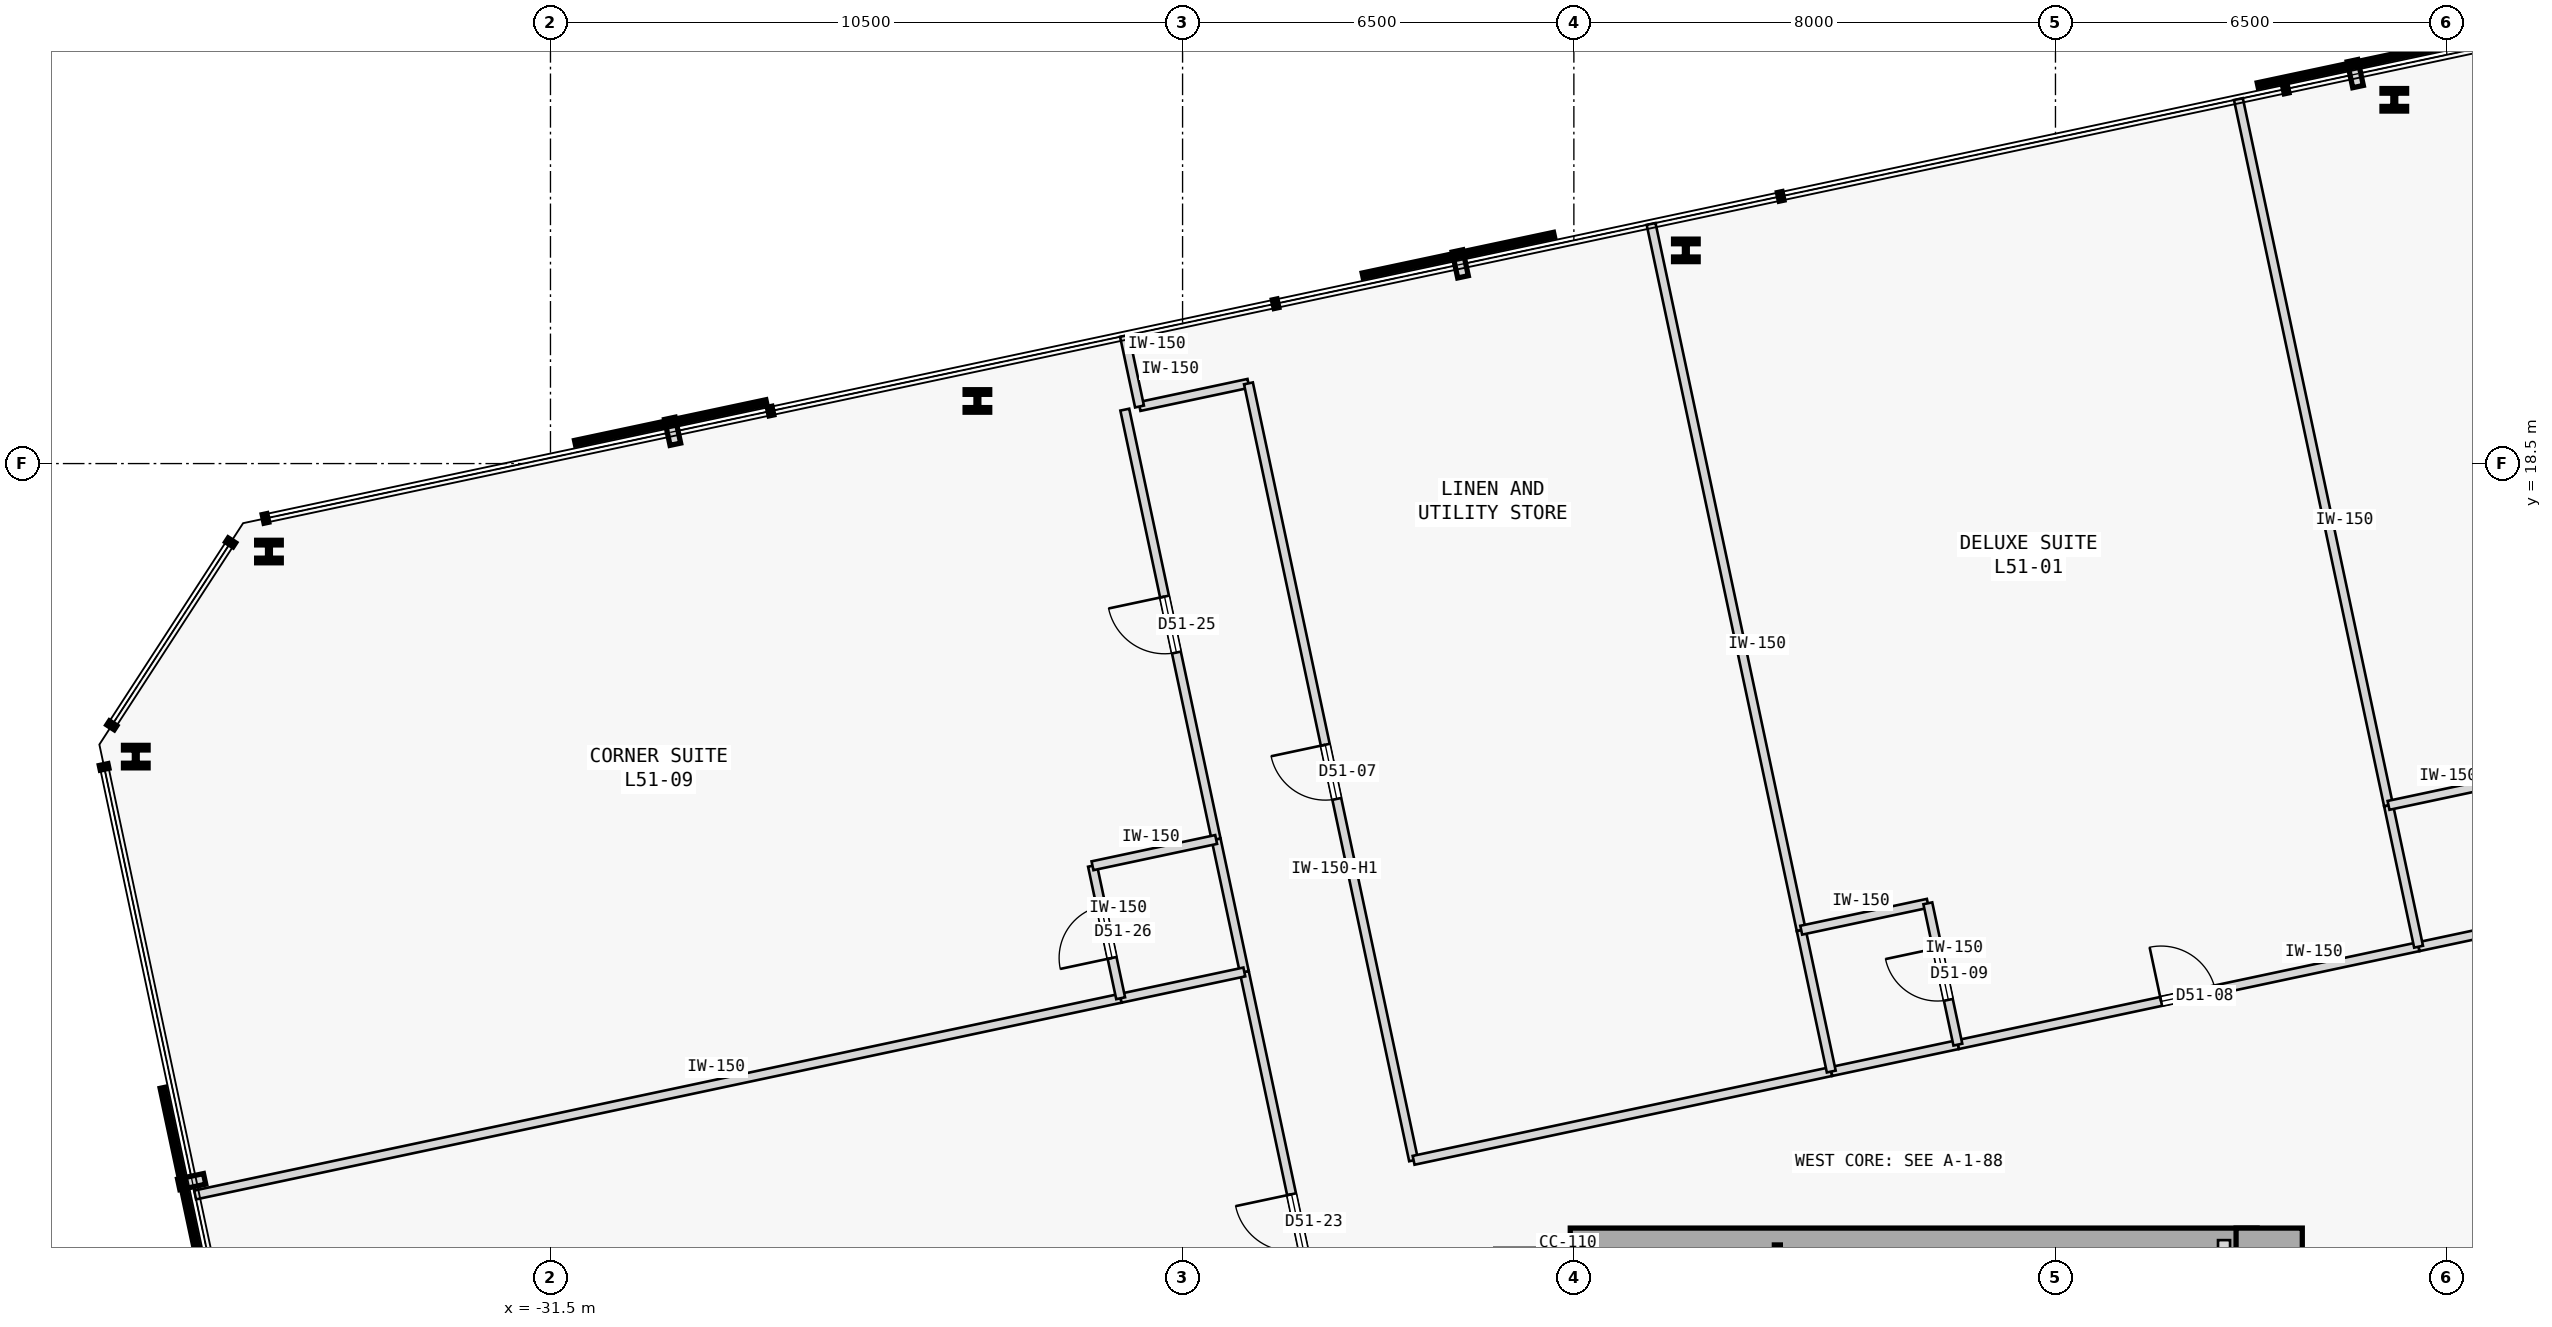
"""IFC4 building model, lengths in metres.
Left out: names, types, materials, properties, quantities, classifications, styles, units other than length and angle.
Written with IfcOpenShell. Run it as: python <this file> out.ifc"""

import sys

from ifc_helpers import new_model, si_unit, direction, frame, frame_2d, origin, origin_2d, place, context, subcontext, project, spatial, rectangle, hollow_rectangle, i_section, extrude, element, fill, save


model = new_model("IFC4")
c1 = context("Model", 3, precision=1e-05, world=origin(), true_north=direction((0.0, 1.0)))
c2 = subcontext(c1, "Body", "Model", "MODEL_VIEW")
j1 = project(units=[si_unit("LENGTHUNIT", "METRE"), si_unit("PLANEANGLEUNIT", "RADIAN")], contexts=[c1])
p1 = place(None, origin())
s1 = spatial("IfcSite", under=j1, at=p1, CompositionType="ELEMENT")
p2 = place(p1, origin())
s2 = spatial("IfcBuilding", under=s1, at=p2, CompositionType="ELEMENT")
p3 = place(p2, frame((0.0, 0.0, 195.6)))
s3 = spatial("IfcBuildingStorey", under=s2, at=p3, CompositionType="ELEMENT", Elevation=195.6)
p4 = place(p3, frame((-2.95, 5.25, 0.0), z_axis=(0.0, 0.0, 1.0), x_axis=(1.0, 0.0, 0.0)))
e1 = element("IfcColumn", 1, at=p4, inside=s3, PredefinedType="COLUMN", context=c2, shape_type="SweptSolid", body=[
    extrude(rectangle(XDim=1.1, YDim=1.1, at=origin_2d()), origin(), (0.0, 0.0, 1.0), 3.4),
])
p5 = place(p3, frame((-14.56, 5.6, 0.0), z_axis=(0.0, 0.0, 1.0), x_axis=(1.0, 0.0, 0.0)))
e2 = element("IfcWall", 2, at=p5, inside=s3, PredefinedType="SHEAR", context=c2, shape_type="SweptSolid", body=[
    extrude(rectangle(XDim=11.41, YDim=0.4, at=frame_2d((5.705, 0.0))), origin(), (0.0, 0.0, 1.0), 3.175),
])
p6 = place(p3, frame((-11.12, 5.42, 0.0), z_axis=(0.0, 0.0, 1.0), x_axis=(1.0, 0.0, 0.0)))
e3 = element("IfcColumn", 3, at=p6, inside=s3, PredefinedType="COLUMN", context=c2, shape_type="SweptSolid", body=[
    extrude(hollow_rectangle(XDim=0.1, YDim=0.2, WallThickness=0.008, at=origin_2d()), origin(), (0.0, 0.0, 1.0), 3.4),
])
for number, where, z_axis, x_axis in (
    (4, (-0.872, 24.543, 0.0), (0.0, 0.0, 1.0), (1.0, 0.0, 0.0)),
    (5, (-12.64, 22.042, 0.0), (0.0, 0.0, 1.0), (1.0, 0.0, 0.0)),
    (6, (-24.408, 19.54, 0.0), (0.0, 0.0, 1.0), (1.0, 0.0, 0.0)),
    (7, (-36.176, 17.039, 0.0), (0.0, 0.0, 1.0), (1.0, 0.0, 0.0)),
    (8, (-38.389, 13.632, 0.0), (0.0, 0.0, 1.0), (1.0, 0.0, 0.0)),
):
    element("IfcColumn", number, at=place(p3, frame(where, z_axis=z_axis, x_axis=x_axis)), inside=s3, PredefinedType="COLUMN", context=c2, shape_type="SweptSolid", body=[
        extrude(i_section(OverallWidth=0.409, OverallDepth=0.374, WebThickness=0.048, FlangeThickness=0.077, FilletRadius=0.015, at=origin_2d()), origin(), (0.0, 0.0, 1.0), 3.4),
    ])
p7 = place(p3, frame((-3.7, -1.15, 0.0), z_axis=(0.0, 0.0, 1.0), x_axis=(0.0, 1.0, 0.0)))
e9 = element("IfcWall", 9, at=p7, inside=s3, PredefinedType="STANDARD", context=c2, shape_type="SweptSolid", body=[
    extrude(rectangle(XDim=6.75, YDim=0.2, at=frame_2d((3.375, 0.0))), origin(), (0.0, 0.0, 1.0), 3.175),
])
p8 = place(p7, frame((3.6, 0.0, 0.0)))
e10 = element("IfcOpeningElement", 10, at=p8, cuts=e9, PredefinedType="OPENING", context=c2, shape_type="SweptSolid", body=[
    extrude(rectangle(XDim=0.92, YDim=2.15, at=frame_2d((0.46, 1.075))), frame((0.0, 0.11, 0.0), z_axis=(0.0, -1.0, 0.0), x_axis=(1.0, 0.0, 0.0)), (0.0, 0.0, 1.0), 0.22),
])
p9 = place(p3, frame((-21.715, 19.448, 0.0), z_axis=(0.0, 0.0, 1.0), x_axis=(0.978160192495, 0.207852442415, 0.0)))
e11 = element("IfcWall", 11, at=p9, inside=s3, PredefinedType="PARTITIONING", context=c2, shape_type="SweptSolid", body=[
    extrude(rectangle(XDim=1.85, YDim=0.15, at=frame_2d((0.925, 0.0))), origin(), (0.0, 0.0, 1.0), 3.175),
])
p10 = place(p3, frame((-17.162, 6.926, 0.0), z_axis=(0.0, 0.0, 1.0), x_axis=(-0.207911421929, 0.978147657888, 0.0)))
e12 = element("IfcWall", 12, at=p10, inside=s3, PredefinedType="PARTITIONING", context=c2, shape_type="SweptSolid", body=[
    extrude(rectangle(XDim=13.195, YDim=0.15, at=frame_2d((6.598, 0.0))), origin(), (0.0, 0.0, 1.0), 2.725),
])
p11 = place(p10, frame((6.137, 0.0, 0.0)))
e13 = element("IfcOpeningElement", 13, at=p11, cuts=e12, PredefinedType="OPENING", context=c2, shape_type="SweptSolid", body=[
    extrude(rectangle(XDim=0.92, YDim=2.15, at=frame_2d((0.46, 1.075))), frame((0.0, 0.085, 0.0), z_axis=(0.0, -1.0, 0.0), x_axis=(1.0, 0.0, 0.0)), (0.0, 0.0, 1.0), 0.17),
])
p12 = place(p3, frame((-17.162, 6.926, 0.0), z_axis=(0.0, 0.0, 1.0), x_axis=(0.978143627193, 0.207930383978, 0.0)))
e14 = element("IfcWall", 14, at=p12, inside=s3, PredefinedType="PARTITIONING", context=c2, shape_type="SweptSolid", body=[
    extrude(rectangle(XDim=7.093, YDim=0.15, at=frame_2d((3.546, 0.0))), origin(), (0.0, 0.0, 1.0), 3.175),
])
p13 = place(p3, frame((-8.121, 8.848, 0.0), z_axis=(0.0, 0.0, 1.0), x_axis=(0.978146318695, 0.207917722244, 0.0)))
e15 = element("IfcWall", 15, at=p13, inside=s3, PredefinedType="PARTITIONING", context=c2, shape_type="SweptSolid", body=[
    extrude(rectangle(XDim=7.824, YDim=0.15, at=frame_2d((3.912, 0.0))), origin(), (0.0, 0.0, 1.0), 3.175),
])
p14 = place(p13, frame((3.452, 0.0, 0.0)))
e16 = element("IfcOpeningElement", 16, at=p14, cuts=e15, PredefinedType="OPENING", context=c2, shape_type="SweptSolid", body=[
    extrude(rectangle(XDim=0.92, YDim=2.15, at=frame_2d((0.46, 1.075))), frame((0.0, 0.085, 0.0), z_axis=(0.0, -1.0, 0.0), x_axis=(1.0, 0.0, 0.0)), (0.0, 0.0, 1.0), 0.17),
])
for number, where, z_axis, x_axis in (
    (17, (-10.224, 8.401, 0.0), (0.0, 0.0, 1.0), (0.978, 0.208, 0.0)),
    (18, (-0.469, 10.474, 0.0), (0.0, 0.0, 1.0), (0.978, 0.208, 0.0)),
):
    element("IfcWall", number, at=place(p3, frame(where, z_axis=z_axis, x_axis=x_axis)), inside=s3, PredefinedType="PARTITIONING", context=c2, shape_type="SweptSolid", body=[
        extrude(rectangle(XDim=2.15, YDim=0.15, at=frame_2d((1.075, 0.0))), origin(), (0.0, 0.0, 1.0), 3.175),
    ])
p15 = place(p3, frame((-18.207, 1.74, 0.0), z_axis=(0.0, 0.0, 1.0), x_axis=(-0.207922306475, 0.978145344246, 0.0)))
e19 = element("IfcWall", 19, at=p15, inside=s3, PredefinedType="PARTITIONING", context=c2, shape_type="SweptSolid", body=[
    extrude(rectangle(XDim=8.5, YDim=0.15, at=frame_2d((4.25, 0.0))), origin(), (0.0, 0.0, 1.0), 3.175),
])
p16 = place(p15, frame((3.775, 0.0, 0.0)))
e20 = element("IfcOpeningElement", 20, at=p16, cuts=e19, PredefinedType="OPENING", context=c2, shape_type="SweptSolid", body=[
    extrude(rectangle(XDim=0.95, YDim=2.15, at=frame_2d((0.475, 1.075))), frame((0.0, 0.085, 0.0), z_axis=(0.0, -1.0, 0.0), x_axis=(1.0, 0.0, 0.0)), (0.0, 0.0, 1.0), 0.17),
])
p17 = place(p3, frame((-20.442, 12.255, 0.0), z_axis=(0.0, 0.0, 1.0), x_axis=(-0.207916352354, 0.978146609882, 0.0)))
e21 = element("IfcWall", 21, at=p17, inside=s3, PredefinedType="PARTITIONING", context=c2, shape_type="SweptSolid", body=[
    extrude(rectangle(XDim=7.3, YDim=0.15, at=frame_2d((3.65, 0.0))), origin(), (0.0, 0.0, 1.0), 3.175),
])
p18 = place(p17, frame((3.175, 0.0, 0.0)))
e22 = element("IfcOpeningElement", 22, at=p18, cuts=e21, PredefinedType="OPENING", context=c2, shape_type="SweptSolid", body=[
    extrude(rectangle(XDim=0.95, YDim=2.15, at=frame_2d((0.475, 1.075))), frame((0.0, 0.085, 0.0), z_axis=(0.0, -1.0, 0.0), x_axis=(1.0, 0.0, 0.0)), (0.0, 0.0, 1.0), 0.17),
])
p19 = place(p3, frame((-19.974, 10.055, 0.0), z_axis=(0.0, 0.0, 1.0), x_axis=(-0.207913264065, 0.978147266328, 0.0)))
e23 = element("IfcWall", 23, at=p19, inside=s3, PredefinedType="PARTITIONING", context=c2, shape_type="SweptSolid", body=[
    extrude(rectangle(XDim=2.25, YDim=0.15, at=frame_2d((1.125, 0.0))), origin(), (0.0, 0.0, 1.0), 3.175),
])
p20 = place(p3, frame((-10.723, 10.748, 0.0), z_axis=(0.0, 0.0, 1.0), x_axis=(-0.207914988081, 0.978146899873, 0.0)))
e24 = element("IfcWall", 24, at=p20, inside=s3, PredefinedType="PARTITIONING", context=c2, shape_type="SweptSolid", body=[
    extrude(rectangle(XDim=11.995, YDim=0.15, at=frame_2d((5.998, 0.0))), origin(), (0.0, 0.0, 1.0), 3.175),
])
p21 = place(p3, frame((-10.224, 8.401, 0.0), z_axis=(0.0, 0.0, 1.0), x_axis=(-0.207917150959, 0.978146440129, 0.0)))
e25 = element("IfcWall", 25, at=p21, inside=s3, PredefinedType="PARTITIONING", context=c2, shape_type="SweptSolid", body=[
    extrude(rectangle(XDim=2.4, YDim=0.15, at=frame_2d((1.2, 0.0))), origin(), (0.0, 0.0, 1.0), 3.175),
])
p22 = place(p3, frame((-21.715, 19.448, 0.0), z_axis=(0.0, 0.0, 1.0), x_axis=(-0.20795853359, 0.978137642823, 0.0)))
e26 = element("IfcWall", 26, at=p22, inside=s3, PredefinedType="PARTITIONING", context=c2, shape_type="SweptSolid", body=[
    extrude(rectangle(XDim=1.2, YDim=0.15, at=frame_2d((0.6, 0.0))), origin(), (0.0, 0.0, 1.0), 3.175),
])
p23 = place(p3, frame((-10.723, 10.748, 0.0), z_axis=(0.0, 0.0, 1.0), x_axis=(0.978146728319, 0.207915795165, 0.0)))
e27 = element("IfcWall", 27, at=p23, inside=s3, PredefinedType="PARTITIONING", context=c2, shape_type="SweptSolid", body=[
    extrude(rectangle(XDim=2.15, YDim=0.15, at=frame_2d((1.075, 0.0))), origin(), (0.0, 0.0, 1.0), 3.175),
])
p24 = place(p3, frame((-8.121, 8.848, 0.0), z_axis=(0.0, 0.0, 1.0), x_axis=(-0.207917150959, 0.978146440129, 0.0)))
e28 = element("IfcWall", 28, at=p24, inside=s3, PredefinedType="PARTITIONING", context=c2, shape_type="SweptSolid", body=[
    extrude(rectangle(XDim=2.4, YDim=0.15, at=frame_2d((1.2, 0.0))), origin(), (0.0, 0.0, 1.0), 3.175),
])
p25 = place(p24, frame((0.76, 0.0, 0.0)))
e29 = element("IfcOpeningElement", 29, at=p25, cuts=e28, PredefinedType="OPENING", context=c2, shape_type="SweptSolid", body=[
    extrude(rectangle(XDim=0.88, YDim=2.15, at=frame_2d((0.44, 1.075))), frame((0.0, 0.085, 0.0), z_axis=(0.0, -1.0, 0.0), x_axis=(1.0, 0.0, 0.0)), (0.0, 0.0, 1.0), 0.17),
])
p26 = place(p3, frame((-0.967, 12.822, 0.0), z_axis=(0.0, 0.0, 1.0), x_axis=(-0.207914988081, 0.978146899873, 0.0)))
e30 = element("IfcWall", 30, at=p26, inside=s3, PredefinedType="PARTITIONING", context=c2, shape_type="SweptSolid", body=[
    extrude(rectangle(XDim=11.995, YDim=0.15, at=frame_2d((5.998, 0.0))), origin(), (0.0, 0.0, 1.0), 3.175),
])
p27 = place(p3, frame((-0.469, 10.474, 0.0), z_axis=(0.0, 0.0, 1.0), x_axis=(-0.207819824493, 0.978167123015, 0.0)))
e31 = element("IfcWall", 31, at=p27, inside=s3, PredefinedType="PARTITIONING", context=c2, shape_type="SweptSolid", body=[
    extrude(rectangle(XDim=2.4, YDim=0.15, at=frame_2d((1.2, 0.0))), origin(), (0.0, 0.0, 1.0), 3.175),
])
p28 = place(p3, frame((-0.967, 12.822, 0.0), z_axis=(0.0, 0.0, 1.0), x_axis=(0.978169816376, 0.207807146966, 0.0)))
e32 = element("IfcWall", 32, at=p28, inside=s3, PredefinedType="PARTITIONING", context=c2, shape_type="SweptSolid", body=[
    extrude(rectangle(XDim=2.15, YDim=0.15, at=frame_2d((1.075, 0.0))), origin(), (0.0, 0.0, 1.0), 3.175),
])
p29 = place(p3, frame((-37.403, 6.35, 0.0), z_axis=(0.0, 0.0, 1.0), x_axis=(0.978149296727, 0.207903711638, 0.0)))
e33 = element("IfcWall", 33, at=p29, inside=s3, PredefinedType="PARTITIONING", context=c2, shape_type="SweptSolid", body=[
    extrude(rectangle(XDim=15.718, YDim=0.15, at=frame_2d((7.859, 0.0))), origin(), (0.0, 0.0, 1.0), 3.175),
])
p30 = place(p3, frame((-22.029, 9.618, 0.0), z_axis=(0.0, 0.0, 1.0), x_axis=(0.978134617382, 0.207972763311, 0.0)))
e34 = element("IfcWall", 34, at=p30, inside=s3, PredefinedType="PARTITIONING", context=c2, shape_type="SweptSolid", body=[
    extrude(rectangle(XDim=2.1, YDim=0.15, at=frame_2d((1.05, 0.0))), origin(), (0.0, 0.0, 1.0), 3.175),
])
p31 = place(p3, frame((-22.029, 9.618, 0.0), z_axis=(0.0, 0.0, 1.0), x_axis=(-0.207891197838, 0.978151956427, 0.0)))
e35 = element("IfcWall", 35, at=p31, inside=s3, PredefinedType="PARTITIONING", context=c2, shape_type="SweptSolid", body=[
    extrude(rectangle(XDim=2.25, YDim=0.15, at=frame_2d((1.125, 0.0))), origin(), (0.0, 0.0, 1.0), 3.175),
])
p32 = place(p31, frame((0.685, 0.0, 0.0)))
e36 = element("IfcOpeningElement", 36, at=p32, cuts=e35, PredefinedType="OPENING", context=c2, shape_type="SweptSolid", body=[
    extrude(rectangle(XDim=0.88, YDim=2.15, at=frame_2d((0.44, 1.075))), frame((0.0, 0.085, 0.0), z_axis=(0.0, -1.0, 0.0), x_axis=(1.0, 0.0, 0.0)), (0.0, 0.0, 1.0), 0.17),
])
p33 = place(p3, frame((-22.496, 11.819, 0.0), z_axis=(0.0, 0.0, 1.0), x_axis=(0.97815826, 0.207861536591, 0.0)))
e37 = element("IfcWall", 37, at=p33, inside=s3, PredefinedType="PARTITIONING", context=c2, shape_type="SweptSolid", body=[
    extrude(rectangle(XDim=2.1, YDim=0.15, at=frame_2d((1.05, 0.0))), origin(), (0.0, 0.0, 1.0), 3.175),
])
p34 = place(p11, origin())
e38 = element("IfcDoor", 38, at=p34, inside=s3, OperationType="SINGLE_SWING_RIGHT", PredefinedType="DOOR", context=c2, shape_type="SweptSolid", body=[
    extrude(rectangle(XDim=0.92, YDim=2.15, at=frame_2d((0.46, 1.075))), frame((0.0, 0.025, 0.0), z_axis=(0.0, -1.0, 0.0), x_axis=(1.0, 0.0, 0.0)), (0.0, 0.0, 1.0), 0.05),
])
fill(e13, e38)
p35 = place(p14, origin())
e39 = element("IfcDoor", 39, at=p35, inside=s3, OperationType="SINGLE_SWING_LEFT", PredefinedType="DOOR", context=c2, shape_type="SweptSolid", body=[
    extrude(rectangle(XDim=0.92, YDim=2.15, at=frame_2d((0.46, 1.075))), frame((0.0, 0.025, 0.0), z_axis=(0.0, -1.0, 0.0), x_axis=(1.0, 0.0, 0.0)), (0.0, 0.0, 1.0), 0.05),
])
fill(e16, e39)
p36 = place(p25, origin())
e40 = element("IfcDoor", 40, at=p36, inside=s3, OperationType="SINGLE_SWING_RIGHT", PredefinedType="DOOR", context=c2, shape_type="SweptSolid", body=[
    extrude(rectangle(XDim=0.88, YDim=2.15, at=frame_2d((0.44, 1.075))), frame((0.0, 0.025, 0.0), z_axis=(0.0, -1.0, 0.0), x_axis=(1.0, 0.0, 0.0)), (0.0, 0.0, 1.0), 0.05),
])
fill(e29, e40)
p37 = place(p16, origin())
e41 = element("IfcDoor", 41, at=p37, inside=s3, OperationType="SINGLE_SWING_RIGHT", PredefinedType="DOOR", context=c2, shape_type="SweptSolid", body=[
    extrude(rectangle(XDim=0.95, YDim=2.15, at=frame_2d((0.475, 1.075))), frame((0.0, 0.025, 0.0), z_axis=(0.0, -1.0, 0.0), x_axis=(1.0, 0.0, 0.0)), (0.0, 0.0, 1.0), 0.05),
])
fill(e20, e41)
p38 = place(p18, origin())
e42 = element("IfcDoor", 42, at=p38, inside=s3, OperationType="SINGLE_SWING_RIGHT", PredefinedType="DOOR", context=c2, shape_type="SweptSolid", body=[
    extrude(rectangle(XDim=0.95, YDim=2.15, at=frame_2d((0.475, 1.075))), frame((0.0, 0.025, 0.0), z_axis=(0.0, -1.0, 0.0), x_axis=(1.0, 0.0, 0.0)), (0.0, 0.0, 1.0), 0.05),
])
fill(e22, e42)
p39 = place(p32, origin())
e43 = element("IfcDoor", 43, at=p39, inside=s3, OperationType="SINGLE_SWING_LEFT", PredefinedType="DOOR", context=c2, shape_type="SweptSolid", body=[
    extrude(rectangle(XDim=0.88, YDim=2.15, at=frame_2d((0.44, 1.075))), frame((0.0, 0.025, 0.0), z_axis=(0.0, -1.0, 0.0), x_axis=(1.0, 0.0, 0.0)), (0.0, 0.0, 1.0), 0.05),
])
fill(e36, e43)
save(model, sys.argv[1])
